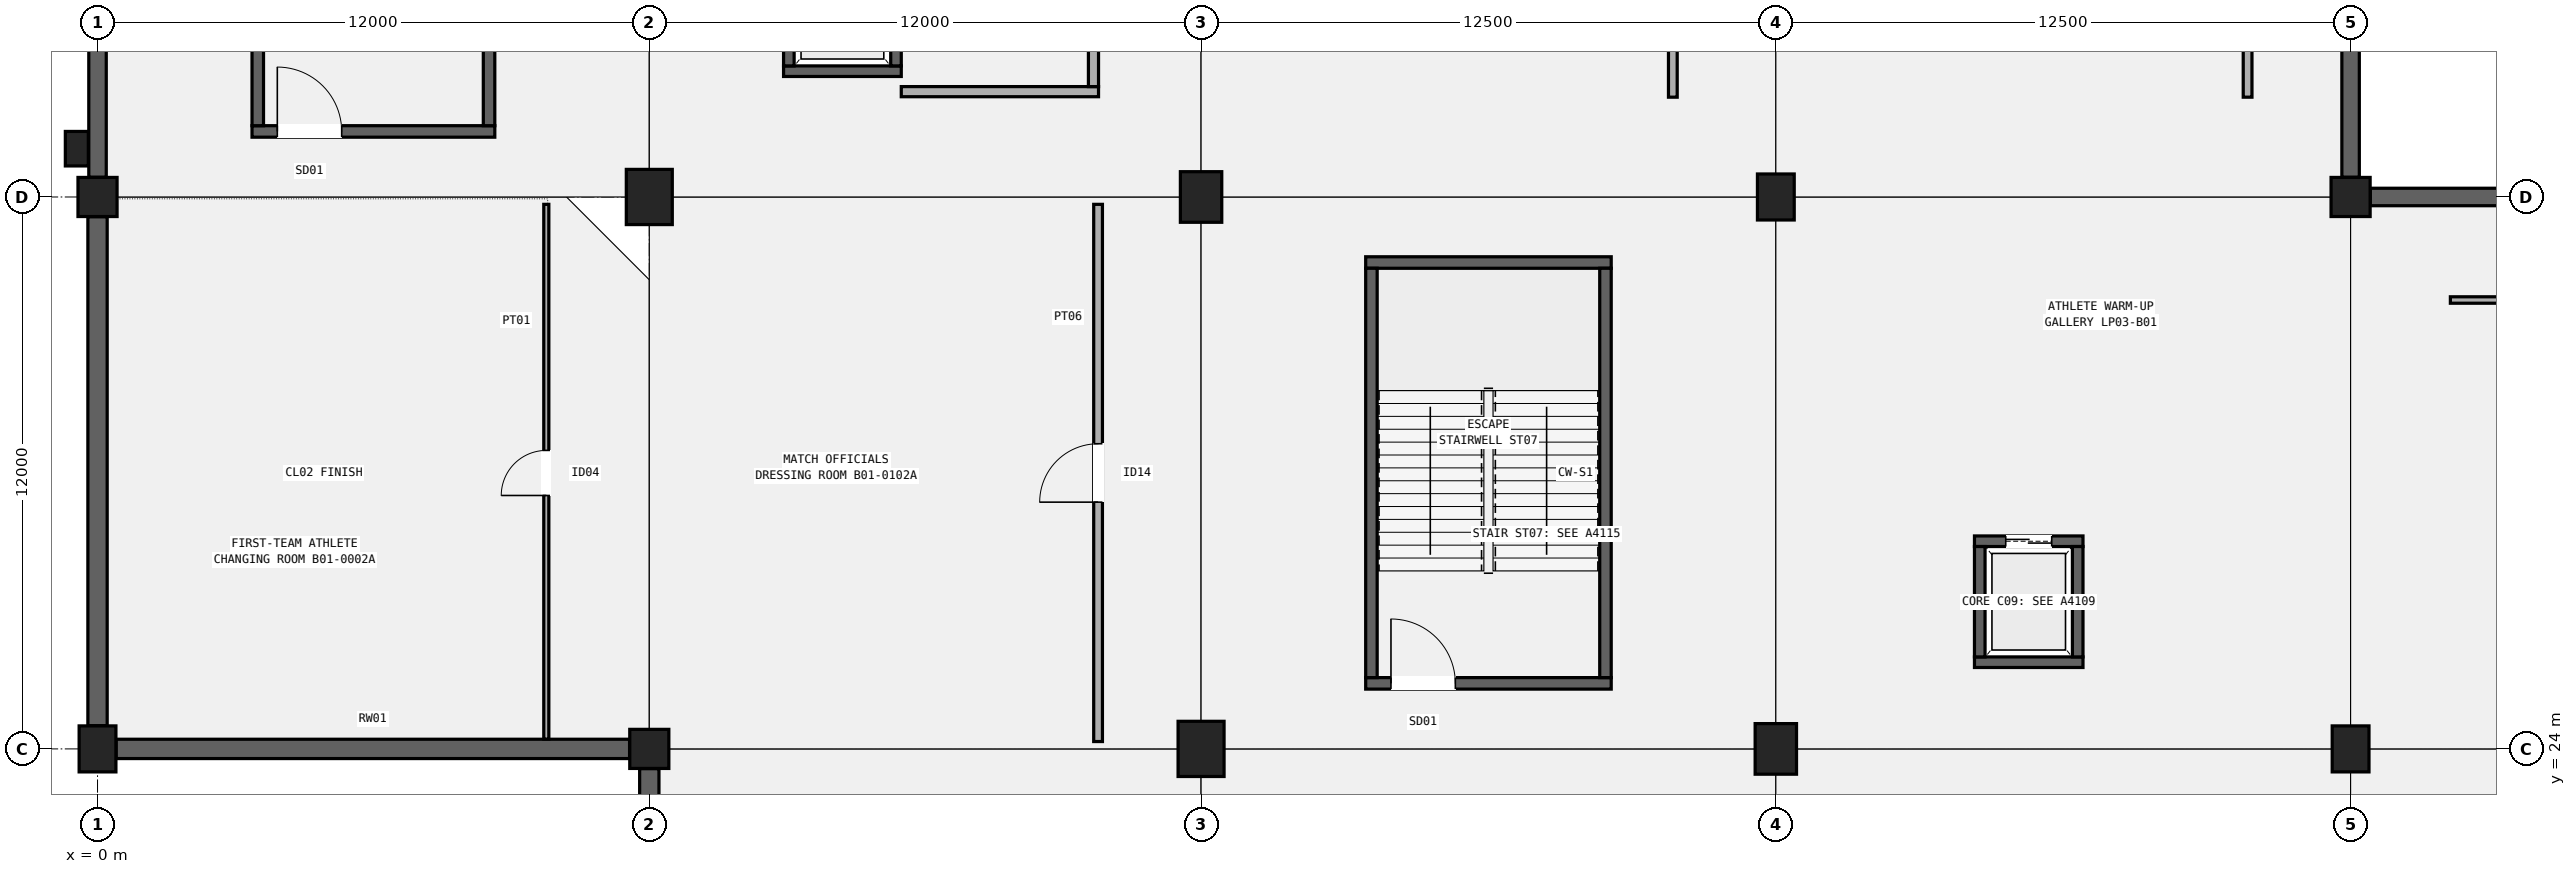
"""IFC4 building model, lengths in metres.
Left out: names, types, materials, properties, quantities, classifications, styles, units other than length and angle.
Written with IfcOpenShell. Run it as: python <this file> out.ifc"""

import sys

from ifc_helpers import new_model, si_unit, direction, frame, frame_2d, origin, origin_2d, place, context, subcontext, project, spatial, rectangle, circle, extrude, element, fill, save


model = new_model("IFC4")
c1 = context("Model", 3, precision=1e-05, world=origin(), true_north=direction((0.0, 1.0)))
c2 = subcontext(c1, "Body", "Model", "MODEL_VIEW")
j1 = project(units=[si_unit("LENGTHUNIT", "METRE"), si_unit("PLANEANGLEUNIT", "RADIAN")], contexts=[c1])
p1 = place(None, origin())
s1 = spatial("IfcSite", under=j1, at=p1, CompositionType="ELEMENT")
p2 = place(p1, origin())
s2 = spatial("IfcBuilding", under=s1, at=p2, CompositionType="ELEMENT")
p3 = place(p2, frame((0.0, 0.0, -4.8)))
s3 = spatial("IfcBuildingStorey", under=s2, at=p3, CompositionType="ELEMENT", Elevation=-4.8)
p4 = place(p3, frame((0.0, 24.0, 0.0), z_axis=(0.0, 0.0, 1.0), x_axis=(1.0, 0.0, 0.0)))
e1 = element("IfcColumn", 1, at=p4, inside=s3, PredefinedType="COLUMN", context=c2, shape_type="SweptSolid", body=[
    extrude(rectangle(XDim=0.8, YDim=1.0, at=origin_2d()), origin(), (0.0, 0.0, 1.0), 4.8),
])
for number, where, z_axis, x_axis in (
    (2, (0.0, 36.0, 0.0), (0.0, 0.0, 1.0), (1.0, 0.0, 0.0)),
    (3, (12.0, 24.0, 0.0), (0.0, 0.0, 1.0), (1.0, 0.0, 0.0)),
):
    element("IfcColumn", number, at=place(p3, frame(where, z_axis=z_axis, x_axis=x_axis)), inside=s3, PredefinedType="COLUMN", context=c2, shape_type="SweptSolid", body=[
        extrude(circle(Radius=0.425, at=origin_2d()), origin(), (0.0, 0.0, 1.0), 4.8),
    ])
for number, where, z_axis, x_axis in (
    (4, (12.0, 36.0, 0.0), (0.0, 0.0, 1.0), (1.0, 0.0, 0.0)),
    (5, (24.0, 24.0, 0.0), (0.0, 0.0, 1.0), (1.0, 0.0, 0.0)),
):
    element("IfcColumn", number, at=place(p3, frame(where, z_axis=z_axis, x_axis=x_axis)), inside=s3, PredefinedType="COLUMN", context=c2, shape_type="SweptSolid", body=[
        extrude(rectangle(XDim=1.0, YDim=1.2, at=origin_2d()), origin(), (0.0, 0.0, 1.0), 4.8),
    ])
for number, where, z_axis, x_axis in (
    (6, (24.0, 36.0, 0.0), (0.0, 0.0, 1.0), (1.0, 0.0, 0.0)),
    (7, (36.5, 24.0, 0.0), (0.0, 0.0, 1.0), (1.0, 0.0, 0.0)),
):
    element("IfcColumn", number, at=place(p3, frame(where, z_axis=z_axis, x_axis=x_axis)), inside=s3, PredefinedType="COLUMN", context=c2, shape_type="SweptSolid", body=[
        extrude(rectangle(XDim=0.9, YDim=1.1, at=origin_2d()), origin(), (0.0, 0.0, 1.0), 4.8),
    ])
for number, where, z_axis, x_axis in (
    (8, (36.5, 36.0, 0.0), (0.0, 0.0, 1.0), (1.0, 0.0, 0.0)),
    (9, (49.0, 24.0, 0.0), (0.0, 0.0, 1.0), (1.0, 0.0, 0.0)),
):
    element("IfcColumn", number, at=place(p3, frame(where, z_axis=z_axis, x_axis=x_axis)), inside=s3, PredefinedType="COLUMN", context=c2, shape_type="SweptSolid", body=[
        extrude(rectangle(XDim=0.8, YDim=1.0, at=origin_2d()), origin(), (0.0, 0.0, 1.0), 4.8),
    ])
p5 = place(p3, frame((49.0, 36.0, 0.0), z_axis=(0.0, 0.0, 1.0), x_axis=(1.0, 0.0, 0.0)))
e10 = element("IfcColumn", 10, at=p5, inside=s3, PredefinedType="COLUMN", context=c2, shape_type="SweptSolid", body=[
    extrude(circle(Radius=0.425, at=origin_2d()), origin(), (0.0, 0.0, 1.0), 4.8),
])
p6 = place(p3, frame((-0.45, 37.05, 0.0), z_axis=(0.0, 0.0, 1.0), x_axis=(1.0, 0.0, 0.0)))
e11 = element("IfcColumn", 11, at=p6, inside=s3, PredefinedType="PILASTER", context=c2, shape_type="SweptSolid", body=[
    extrude(rectangle(XDim=0.5, YDim=0.75, at=origin_2d()), origin(), (0.0, 0.0, 1.0), 4.8),
])
p7 = place(p3, frame((0.404, 24.0, 0.0), z_axis=(0.0, 0.0, 1.0), x_axis=(1.0, 0.0, 0.0)))
e12 = element("IfcWall", 12, at=p7, inside=s3, PredefinedType="STANDARD", context=c2, shape_type="SweptSolid", body=[
    extrude(rectangle(XDim=11.167, YDim=0.42, at=frame_2d((5.583, 0.0))), origin(), (0.0, 0.0, 1.0), 4.46),
])
p8 = place(p3, frame((0.0, 24.504, 0.0), z_axis=(0.0, 0.0, 1.0), x_axis=(0.0, 1.0, 0.0)))
e13 = element("IfcWall", 13, at=p8, inside=s3, PredefinedType="STANDARD", context=c2, shape_type="SweptSolid", body=[
    extrude(rectangle(XDim=11.067, YDim=0.42, at=frame_2d((5.534, 0.0))), origin(), (0.0, 0.0, 1.0), 4.46),
])
p9 = place(p3, frame((0.0, 36.429, 0.0), z_axis=(0.0, 0.0, 1.0), x_axis=(0.0, 1.0, 0.0)))
e14 = element("IfcWall", 14, at=p9, inside=s3, PredefinedType="STANDARD", context=c2, shape_type="SweptSolid", body=[
    extrude(rectangle(XDim=10.967, YDim=0.38, at=frame_2d((5.483, 0.0))), origin(), (0.0, 0.0, 1.0), 4.46),
])
p10 = place(p3, frame((12.0, 12.504, 0.0), z_axis=(0.0, 0.0, 1.0), x_axis=(0.0, 1.0, 0.0)))
e15 = element("IfcWall", 15, at=p10, inside=s3, PredefinedType="STANDARD", context=c2, shape_type="SweptSolid", body=[
    extrude(rectangle(XDim=11.067, YDim=0.42, at=frame_2d((5.534, 0.0))), origin(), (0.0, 0.0, 1.0), 4.46),
])
p11 = place(p3, frame((49.0, 36.429, 0.0), z_axis=(0.0, 0.0, 1.0), x_axis=(0.0, 1.0, 0.0)))
e16 = element("IfcWall", 16, at=p11, inside=s3, PredefinedType="STANDARD", context=c2, shape_type="SweptSolid", body=[
    extrude(rectangle(XDim=10.967, YDim=0.38, at=frame_2d((5.483, 0.0))), origin(), (0.0, 0.0, 1.0), 4.46),
])
p12 = place(p3, frame((49.429, 36.0, 0.0), z_axis=(0.0, 0.0, 1.0), x_axis=(1.0, 0.0, 0.0)))
e17 = element("IfcWall", 17, at=p12, inside=s3, PredefinedType="STANDARD", context=c2, shape_type="SweptSolid", body=[
    extrude(rectangle(XDim=11.567, YDim=0.38, at=frame_2d((5.784, 0.0))), origin(), (0.0, 0.0, 1.0), 4.46),
])
p13 = place(p3, frame((3.36, 37.425, 0.0), z_axis=(0.0, 0.0, 1.0), x_axis=(1.0, 0.0, 0.0)))
e18 = element("IfcWall", 18, at=p13, inside=s3, PredefinedType="SHEAR", context=c2, shape_type="SweptSolid", body=[
    extrude(rectangle(XDim=5.28, YDim=0.25, at=frame_2d((2.64, 0.0))), origin(), (0.0, 0.0, 1.0), 4.5),
])
p14 = place(p13, frame((0.55, 0.0, 0.0)))
e19 = element("IfcOpeningElement", 19, at=p14, cuts=e18, PredefinedType="OPENING", context=c2, shape_type="SweptSolid", body=[
    extrude(rectangle(XDim=1.4, YDim=2.15, at=frame_2d((0.7, 1.075))), frame((0.0, 0.135, 0.0), z_axis=(0.0, -1.0, 0.0), x_axis=(1.0, 0.0, 0.0)), (0.0, 0.0, 1.0), 0.27),
])
for number, where, z_axis, x_axis in (
    (20, (3.485, 37.55, 0.0), (0.0, 0.0, 1.0), (0.0, 1.0, 0.0)),
    (21, (8.515, 37.55, 0.0), (0.0, 0.0, 1.0), (0.0, 1.0, 0.0)),
):
    element("IfcWall", number, at=place(p3, frame(where, z_axis=z_axis, x_axis=x_axis)), inside=s3, PredefinedType="SHEAR", context=c2, shape_type="SweptSolid", body=[
        extrude(rectangle(XDim=8.9, YDim=0.25, at=frame_2d((4.45, 0.0))), origin(), (0.0, 0.0, 1.0), 4.5),
    ])
p15 = place(p3, frame((27.58, 25.425, 0.0), z_axis=(0.0, 0.0, 1.0), x_axis=(1.0, 0.0, 0.0)))
e22 = element("IfcWall", 22, at=p15, inside=s3, PredefinedType="SHEAR", context=c2, shape_type="SweptSolid", body=[
    extrude(rectangle(XDim=5.34, YDim=0.25, at=frame_2d((2.67, 0.0))), origin(), (0.0, 0.0, 1.0), 4.5),
])
p16 = place(p15, frame((0.55, 0.0, 0.0)))
e23 = element("IfcOpeningElement", 23, at=p16, cuts=e22, PredefinedType="OPENING", context=c2, shape_type="SweptSolid", body=[
    extrude(rectangle(XDim=1.4, YDim=2.15, at=frame_2d((0.7, 1.075))), frame((0.0, 0.135, 0.0), z_axis=(0.0, -1.0, 0.0), x_axis=(1.0, 0.0, 0.0)), (0.0, 0.0, 1.0), 0.27),
])
p17 = place(p3, frame((27.58, 34.575, 0.0), z_axis=(0.0, 0.0, 1.0), x_axis=(1.0, 0.0, 0.0)))
e24 = element("IfcWall", 24, at=p17, inside=s3, PredefinedType="SHEAR", context=c2, shape_type="SweptSolid", body=[
    extrude(rectangle(XDim=5.34, YDim=0.25, at=frame_2d((2.67, 0.0))), origin(), (0.0, 0.0, 1.0), 4.5),
])
for number, where, z_axis, x_axis in (
    (25, (27.705, 25.55, 0.0), (0.0, 0.0, 1.0), (0.0, 1.0, 0.0)),
    (26, (32.795, 25.55, 0.0), (0.0, 0.0, 1.0), (0.0, 1.0, 0.0)),
):
    element("IfcWall", number, at=place(p3, frame(where, z_axis=z_axis, x_axis=x_axis)), inside=s3, PredefinedType="SHEAR", context=c2, shape_type="SweptSolid", body=[
        extrude(rectangle(XDim=8.9, YDim=0.25, at=frame_2d((4.45, 0.0))), origin(), (0.0, 0.0, 1.0), 4.5),
    ])
p18 = place(p3, frame((14.92, 38.735, -0.65), z_axis=(0.0, 0.0, 1.0), x_axis=(1.0, 0.0, 0.0)))
e27 = element("IfcWall", 27, at=p18, inside=s3, PredefinedType="SHEAR", context=c2, shape_type="SweptSolid", body=[
    extrude(rectangle(XDim=2.56, YDim=0.23, at=frame_2d((1.28, 0.0))), origin(), (0.0, 0.0, 1.0), 4.5),
])
p19 = place(p3, frame((15.035, 38.85, -0.65), z_axis=(0.0, 0.0, 1.0), x_axis=(0.0, 1.0, 0.0)))
e28 = element("IfcWall", 28, at=p19, inside=s3, PredefinedType="SHEAR", context=c2, shape_type="SweptSolid", body=[
    extrude(rectangle(XDim=2.7, YDim=0.23, at=frame_2d((1.35, 0.0))), origin(), (0.0, 0.0, 1.0), 4.5),
])
p20 = place(p3, frame((17.365, 38.85, -0.65), z_axis=(0.0, 0.0, 1.0), x_axis=(0.0, 1.0, 0.0)))
e29 = element("IfcWall", 29, at=p20, inside=s3, PredefinedType="SHEAR", context=c2, shape_type="SweptSolid", body=[
    extrude(rectangle(XDim=2.7, YDim=0.23, at=frame_2d((1.35, 0.0))), origin(), (0.0, 0.0, 1.0), 4.5),
])
p21 = place(p20, frame((0.8, 0.0, 0.65)))
e30 = element("IfcOpeningElement", 30, at=p21, cuts=e29, PredefinedType="OPENING", context=c2, shape_type="SweptSolid", body=[
    extrude(rectangle(XDim=1.1, YDim=2.15, at=frame_2d((0.55, 1.075))), frame((0.0, 0.125, 0.0), z_axis=(0.0, -1.0, 0.0), x_axis=(1.0, 0.0, 0.0)), (0.0, 0.0, 1.0), 0.25),
])
p22 = place(p3, frame((17.48, 38.29, -0.65), z_axis=(0.0, 0.0, 1.0), x_axis=(1.0, 0.0, 0.0)))
e31 = element("IfcWall", 31, at=p22, inside=s3, PredefinedType="SOLIDWALL", context=c2, shape_type="SweptSolid", body=[
    extrude(rectangle(XDim=4.29, YDim=0.22, at=frame_2d((2.145, 0.0))), origin(), (0.0, 0.0, 1.0), 4.57),
])
p23 = place(p3, frame((21.66, 38.4, -0.65), z_axis=(0.0, 0.0, 1.0), x_axis=(0.0, 1.0, 0.0)))
e32 = element("IfcWall", 32, at=p23, inside=s3, PredefinedType="SOLIDWALL", context=c2, shape_type="SweptSolid", body=[
    extrude(rectangle(XDim=3.6, YDim=0.22, at=frame_2d((1.8, 0.0))), origin(), (0.0, 0.0, 1.0), 4.57),
])
p24 = place(p23, frame((1.15, 0.0, 0.65)))
e33 = element("IfcOpeningElement", 33, at=p24, cuts=e32, PredefinedType="OPENING", context=c2, shape_type="SweptSolid", body=[
    extrude(rectangle(XDim=1.3, YDim=2.15, at=frame_2d((0.65, 1.075))), frame((0.0, 0.12, 0.0), z_axis=(0.0, -1.0, 0.0), x_axis=(1.0, 0.0, 0.0)), (0.0, 0.0, 1.0), 0.24),
])
p25 = place(p3, frame((40.82, 25.885, -0.65), z_axis=(0.0, 0.0, 1.0), x_axis=(1.0, 0.0, 0.0)))
e34 = element("IfcWall", 34, at=p25, inside=s3, PredefinedType="SHEAR", context=c2, shape_type="SweptSolid", body=[
    extrude(rectangle(XDim=2.36, YDim=0.23, at=frame_2d((1.18, 0.0))), origin(), (0.0, 0.0, 1.0), 4.5),
])
p26 = place(p3, frame((40.82, 28.515, -0.65), z_axis=(0.0, 0.0, 1.0), x_axis=(1.0, 0.0, 0.0)))
e35 = element("IfcWall", 35, at=p26, inside=s3, PredefinedType="SHEAR", context=c2, shape_type="SweptSolid", body=[
    extrude(rectangle(XDim=2.36, YDim=0.23, at=frame_2d((1.18, 0.0))), origin(), (0.0, 0.0, 1.0), 4.5),
])
p27 = place(p26, frame((0.68, 0.0, 0.65)))
e36 = element("IfcOpeningElement", 36, at=p27, cuts=e35, PredefinedType="OPENING", context=c2, shape_type="SweptSolid", body=[
    extrude(rectangle(XDim=1.0, YDim=2.15, at=frame_2d((0.5, 1.075))), frame((0.0, 0.125, 0.0), z_axis=(0.0, -1.0, 0.0), x_axis=(1.0, 0.0, 0.0)), (0.0, 0.0, 1.0), 0.25),
])
for number, where, z_axis, x_axis in (
    (37, (40.935, 26.0, -0.65), (0.0, 0.0, 1.0), (0.0, 1.0, 0.0)),
    (38, (43.065, 26.0, -0.65), (0.0, 0.0, 1.0), (0.0, 1.0, 0.0)),
):
    element("IfcWall", number, at=place(p3, frame(where, z_axis=z_axis, x_axis=x_axis)), inside=s3, PredefinedType="SHEAR", context=c2, shape_type="SweptSolid", body=[
        extrude(rectangle(XDim=2.4, YDim=0.23, at=frame_2d((1.2, 0.0))), origin(), (0.0, 0.0, 1.0), 4.5),
    ])
p28 = place(p3, frame((9.76, 24.212, 0.0), z_axis=(0.0, 0.0, 1.0), x_axis=(0.0, 1.0, 0.0)))
e39 = element("IfcWall", 39, at=p28, inside=s3, PredefinedType="PARTITIONING", context=c2, shape_type="SweptSolid", body=[
    extrude(rectangle(XDim=11.628, YDim=0.11, at=frame_2d((5.814, 0.0))), origin(), (0.0, 0.0, 1.0), 3.92),
])
p29 = place(p28, frame((5.298, 0.0, 0.0)))
e40 = element("IfcOpeningElement", 40, at=p29, cuts=e39, PredefinedType="OPENING", context=c2, shape_type="SweptSolid", body=[
    extrude(rectangle(XDim=0.98, YDim=2.1, at=frame_2d((0.49, 1.05))), frame((0.0, 0.065, 0.0), z_axis=(0.0, -1.0, 0.0), x_axis=(1.0, 0.0, 0.0)), (0.0, 0.0, 1.0), 0.13),
])
p30 = place(p3, frame((21.76, 24.16, 0.0), z_axis=(0.0, 0.0, 1.0), x_axis=(0.0, 1.0, 0.0)))
e41 = element("IfcWall", 41, at=p30, inside=s3, PredefinedType="PARTITIONING", context=c2, shape_type="SweptSolid", body=[
    extrude(rectangle(XDim=11.68, YDim=0.19, at=frame_2d((5.84, 0.0))), origin(), (0.0, 0.0, 1.0), 3.92),
])
p31 = place(p30, frame((5.205, 0.0, 0.0)))
e42 = element("IfcOpeningElement", 42, at=p31, cuts=e41, PredefinedType="OPENING", context=c2, shape_type="SweptSolid", body=[
    extrude(rectangle(XDim=1.27, YDim=2.2, at=frame_2d((0.635, 1.1))), frame((0.0, 0.105, 0.0), z_axis=(0.0, -1.0, 0.0), x_axis=(1.0, 0.0, 0.0)), (0.0, 0.0, 1.0), 0.21),
])
p32 = place(p3, frame((34.26, 38.17, 0.0), z_axis=(0.0, 0.0, 1.0), x_axis=(0.0, 1.0, 0.0)))
e43 = element("IfcWall", 43, at=p32, inside=s3, PredefinedType="PARTITIONING", context=c2, shape_type="SweptSolid", body=[
    extrude(rectangle(XDim=9.67, YDim=0.19, at=frame_2d((4.835, 0.0))), origin(), (0.0, 0.0, 1.0), 3.92),
])
p33 = place(p32, frame((4.01, 0.0, 0.0)))
e44 = element("IfcOpeningElement", 44, at=p33, cuts=e43, PredefinedType="OPENING", context=c2, shape_type="SweptSolid", body=[
    extrude(rectangle(XDim=1.65, YDim=2.28, at=frame_2d((0.825, 1.14))), frame((0.0, 0.105, 0.0), z_axis=(0.0, -1.0, 0.0), x_axis=(1.0, 0.0, 0.0)), (0.0, 0.0, 1.0), 0.21),
])
p34 = place(p3, frame((46.76, 38.17, 0.0), z_axis=(0.0, 0.0, 1.0), x_axis=(0.0, 1.0, 0.0)))
e45 = element("IfcWall", 45, at=p34, inside=s3, PredefinedType="PARTITIONING", context=c2, shape_type="SweptSolid", body=[
    extrude(rectangle(XDim=9.67, YDim=0.19, at=frame_2d((4.835, 0.0))), origin(), (0.0, 0.0, 1.0), 3.92),
])
p35 = place(p34, frame((1.021, 0.0, 0.0)))
e46 = element("IfcOpeningElement", 46, at=p35, cuts=e45, PredefinedType="OPENING", context=c2, shape_type="SweptSolid", body=[
    extrude(rectangle(XDim=1.3, YDim=2.24, at=frame_2d((0.65, 1.12))), frame((0.0, 0.105, 0.0), z_axis=(0.0, -1.0, 0.0), x_axis=(1.0, 0.0, 0.0)), (0.0, 0.0, 1.0), 0.21),
])
p36 = place(p34, frame((5.922, 0.0, 0.0)))
e47 = element("IfcOpeningElement", 47, at=p36, cuts=e45, PredefinedType="OPENING", context=c2, shape_type="SweptSolid", body=[
    extrude(rectangle(XDim=1.33, YDim=2.22, at=frame_2d((0.665, 1.11))), frame((0.0, 0.105, 0.0), z_axis=(0.0, -1.0, 0.0), x_axis=(1.0, 0.0, 0.0)), (0.0, 0.0, 1.0), 0.21),
])
p37 = place(p3, frame((51.17, 33.76, 0.0), z_axis=(0.0, 0.0, 1.0), x_axis=(1.0, 0.0, 0.0)))
e48 = element("IfcWall", 48, at=p37, inside=s3, PredefinedType="PARTITIONING", context=c2, shape_type="SweptSolid", body=[
    extrude(rectangle(XDim=10.17, YDim=0.14, at=frame_2d((5.085, 0.0))), origin(), (0.0, 0.0, 1.0), 3.92),
])
p38 = place(p37, frame((2.158, 0.0, 0.0), z_axis=(0.0, 0.0, 1.0), x_axis=(-1.0, 0.0, 0.0)))
e49 = element("IfcOpeningElement", 49, at=p38, cuts=e48, PredefinedType="OPENING", context=c2, shape_type="SweptSolid", body=[
    extrude(rectangle(XDim=0.98, YDim=2.1, at=frame_2d((0.49, 1.05))), frame((0.0, 0.08, 0.0), z_axis=(0.0, -1.0, 0.0), x_axis=(1.0, 0.0, 0.0)), (0.0, 0.0, 1.0), 0.16),
])
p39 = place(p37, frame((7.333, 0.0, 0.0), z_axis=(0.0, 0.0, 1.0), x_axis=(-1.0, 0.0, 0.0)))
e50 = element("IfcOpeningElement", 50, at=p39, cuts=e48, PredefinedType="OPENING", context=c2, shape_type="SweptSolid", body=[
    extrude(rectangle(XDim=1.0, YDim=2.14, at=frame_2d((0.5, 1.07))), frame((0.0, 0.08, 0.0), z_axis=(0.0, -1.0, 0.0), x_axis=(1.0, 0.0, 0.0)), (0.0, 0.0, 1.0), 0.16),
])
p40 = place(p14, origin())
e51 = element("IfcDoor", 51, at=p40, inside=s3, OperationType="SINGLE_SWING_LEFT", PredefinedType="DOOR", context=c2, shape_type="SweptSolid", body=[
    extrude(rectangle(XDim=1.4, YDim=2.15, at=frame_2d((0.7, 1.075))), frame((0.0, 0.025, 0.0), z_axis=(0.0, -1.0, 0.0), x_axis=(1.0, 0.0, 0.0)), (0.0, 0.0, 1.0), 0.05),
])
fill(e19, e51)
p41 = place(p16, origin())
e52 = element("IfcDoor", 52, at=p41, inside=s3, OperationType="SINGLE_SWING_LEFT", PredefinedType="DOOR", context=c2, shape_type="SweptSolid", body=[
    extrude(rectangle(XDim=1.4, YDim=2.15, at=frame_2d((0.7, 1.075))), frame((0.0, 0.025, 0.0), z_axis=(0.0, -1.0, 0.0), x_axis=(1.0, 0.0, 0.0)), (0.0, 0.0, 1.0), 0.05),
])
fill(e23, e52)
p42 = place(p27, origin())
e53 = element("IfcDoor", 53, at=p42, inside=s3, OperationType="DOUBLE_DOOR_SLIDING", PredefinedType="DOOR", context=c2, shape_type="SweptSolid", body=[
    extrude(rectangle(XDim=1.0, YDim=2.15, at=frame_2d((0.5, 1.075))), frame((0.0, 0.025, 0.0), z_axis=(0.0, -1.0, 0.0), x_axis=(1.0, 0.0, 0.0)), (0.0, 0.0, 1.0), 0.05),
])
fill(e36, e53)
p43 = place(p29, origin())
e54 = element("IfcDoor", 54, at=p43, inside=s3, OperationType="SINGLE_SWING_LEFT", PredefinedType="DOOR", context=c2, shape_type="SweptSolid", body=[
    extrude(rectangle(XDim=0.98, YDim=2.1, at=frame_2d((0.49, 1.05))), frame((0.0, 0.025, 0.0), z_axis=(0.0, -1.0, 0.0), x_axis=(1.0, 0.0, 0.0)), (0.0, 0.0, 1.0), 0.05),
])
fill(e40, e54)
p44 = place(p31, origin())
e55 = element("IfcDoor", 55, at=p44, inside=s3, OperationType="SINGLE_SWING_LEFT", PredefinedType="DOOR", context=c2, shape_type="SweptSolid", body=[
    extrude(rectangle(XDim=1.27, YDim=2.2, at=frame_2d((0.635, 1.1))), frame((0.0, 0.025, 0.0), z_axis=(0.0, -1.0, 0.0), x_axis=(1.0, 0.0, 0.0)), (0.0, 0.0, 1.0), 0.05),
])
fill(e42, e55)
save(model, sys.argv[1])
